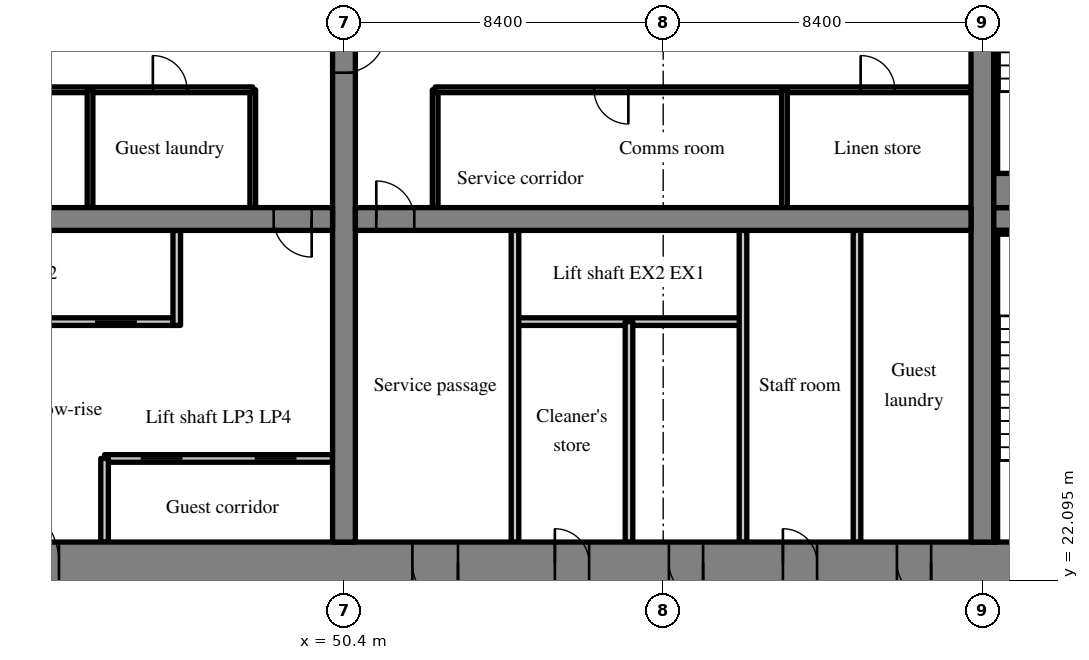
"""IFC4 building model, lengths in metres.
Left out: names, types, materials, properties, quantities, classifications, styles, units other than length and angle.
Written with IfcOpenShell. Run it as: python <this file> out.ifc"""

import sys

from ifc_helpers import new_model, si_unit, direction, frame, frame_2d, origin, place, context, subcontext, project, spatial, rectangle, extrude, source, transform, mapped, element, fill, save


model = new_model("IFC4")
c1 = context("Model", 3, precision=1e-05, world=origin(), true_north=direction((0.0, 1.0)))
c2 = subcontext(c1, "Body", "Model", "MODEL_VIEW")
j1 = project(units=[si_unit("LENGTHUNIT", "METRE"), si_unit("PLANEANGLEUNIT", "RADIAN")], contexts=[c1])
p1 = place(None, origin())
s1 = spatial("IfcSite", under=j1, at=p1, CompositionType="ELEMENT")
p2 = place(p1, origin())
s2 = spatial("IfcBuilding", under=s1, at=p2, CompositionType="ELEMENT")
p3 = place(p2, frame((0.0, 0.0, 35.4)))
s3 = spatial("IfcBuildingStorey", under=s2, at=p3, CompositionType="ELEMENT", Elevation=35.4)
m1 = source(origin(), c2, "Body", "SweptSolid", [
    extrude(rectangle(XDim=50.4, YDim=1.1, at=frame_2d((25.2, 0.0))), origin(), (0.0, 0.0, 1.0), 3.52),
])
p4 = place(p3, frame((25.2, 22.55, 0.0), z_axis=(0.0, 0.0, 1.0), x_axis=(1.0, 0.0, 0.0)))
e1 = element("IfcWall", 1, at=p4, inside=s3, PredefinedType="SHEAR", context=c2, shape_type="MappedRepresentation", body=[
    mapped(m1, transform((0.0, 0.0, 0.0), scale=1.0)),
])
m2 = source(origin(), c2, "Body", "SweptSolid", [
    extrude(rectangle(XDim=1.8, YDim=2.1, at=frame_2d((0.9, 1.05))), frame((0.0, 0.56, 0.0), z_axis=(0.0, -1.0, 0.0), x_axis=(1.0, 0.0, 0.0)), (0.0, 0.0, 1.0), 1.12),
])
p5 = place(p4, frame((15.9, 0.0, 0.0)))
e2 = element("IfcOpeningElement", 2, at=p5, cuts=e1, PredefinedType="OPENING", context=c2, shape_type="MappedRepresentation", body=[
    mapped(m2, transform((0.0, 0.0, 0.0), scale=1.0)),
])
m3 = source(origin(), c2, "Body", "SweptSolid", [
    extrude(rectangle(XDim=1.2, YDim=2.1, at=frame_2d((0.6, 1.05))), frame((0.0, 0.56, 0.0), z_axis=(0.0, -1.0, 0.0), x_axis=(1.0, 0.0, 0.0)), (0.0, 0.0, 1.0), 1.12),
])
p6 = place(p4, frame((27.0, 0.0, 0.0)))
e3 = element("IfcOpeningElement", 3, at=p6, cuts=e1, PredefinedType="OPENING", context=c2, shape_type="MappedRepresentation", body=[
    mapped(m3, transform((0.0, 0.0, 0.0), scale=1.0)),
])
m4 = source(origin(), c2, "Body", "SweptSolid", [
    extrude(rectangle(XDim=0.9, YDim=2.1, at=frame_2d((0.45, 1.05))), frame((0.0, 0.56, 0.0), z_axis=(0.0, -1.0, 0.0), x_axis=(1.0, 0.0, 0.0)), (0.0, 0.0, 1.0), 1.12),
])
p7 = place(p4, frame((33.75, 0.0, 0.0)))
e4 = element("IfcOpeningElement", 4, at=p7, cuts=e1, PredefinedType="OPENING", context=c2, shape_type="MappedRepresentation", body=[
    mapped(m4, transform((0.0, 0.0, 0.0), scale=1.0)),
])
p8 = place(p4, frame((30.75, 0.0, 0.0)))
e5 = element("IfcOpeningElement", 5, at=p8, cuts=e1, PredefinedType="OPENING", context=c2, shape_type="MappedRepresentation", body=[
    mapped(m4, transform((0.0, 0.0, 0.0), scale=1.0)),
])
p9 = place(p4, frame((39.75, 0.0, 0.0)))
e6 = element("IfcOpeningElement", 6, at=p9, cuts=e1, PredefinedType="OPENING", context=c2, shape_type="MappedRepresentation", body=[
    mapped(m4, transform((0.0, 0.0, 0.0), scale=1.0)),
])
p10 = place(p4, frame((36.75, 0.0, 0.0)))
e7 = element("IfcOpeningElement", 7, at=p10, cuts=e1, PredefinedType="OPENING", context=c2, shape_type="MappedRepresentation", body=[
    mapped(m4, transform((0.0, 0.0, 0.0), scale=1.0)),
])
p11 = place(p4, frame((6.425, 0.0, 0.0)))
e8 = element("IfcOpeningElement", 8, at=p11, cuts=e1, PredefinedType="OPENING", context=c2, shape_type="MappedRepresentation", body=[
    mapped(m3, transform((0.0, 0.0, 0.0), scale=1.0)),
])
p12 = place(p4, frame((47.675, 0.0, 0.0)))
e9 = element("IfcOpeningElement", 9, at=p12, cuts=e1, PredefinedType="OPENING", context=c2, shape_type="MappedRepresentation", body=[
    mapped(m3, transform((0.0, 0.0, 0.0), scale=1.0)),
])
m5 = source(origin(), c2, "Body", "SweptSolid", [
    extrude(rectangle(XDim=17.8, YDim=0.6, at=frame_2d((8.9, 0.0))), origin(), (0.0, 0.0, 1.0), 3.52),
])
p13 = place(p3, frame((50.4, 23.1, 0.0), z_axis=(0.0, 0.0, 1.0), x_axis=(0.0, 1.0, 0.0)))
e10 = element("IfcWall", 10, at=p13, inside=s3, PredefinedType="SHEAR", context=c2, shape_type="MappedRepresentation", body=[
    mapped(m5, transform((0.0, 0.0, 0.0), scale=1.0)),
])
m6 = source(origin(), c2, "Body", "SweptSolid", [
    extrude(rectangle(XDim=1.1, YDim=2.1, at=frame_2d((0.55, 1.05))), frame((0.0, 0.31, 0.0), z_axis=(0.0, -1.0, 0.0), x_axis=(1.0, 0.0, 0.0)), (0.0, 0.0, 1.0), 0.62),
])
p14 = place(p13, frame((12.35, 0.0, 0.0)))
e11 = element("IfcOpeningElement", 11, at=p14, cuts=e10, PredefinedType="OPENING", context=c2, shape_type="MappedRepresentation", body=[
    mapped(m6, transform((0.0, 0.0, 0.0), scale=1.0)),
])
p15 = place(p3, frame((67.2, 23.1, 0.0), z_axis=(0.0, 0.0, 1.0), x_axis=(0.0, 1.0, 0.0)))
e12 = element("IfcWall", 12, at=p15, inside=s3, PredefinedType="SHEAR", context=c2, shape_type="MappedRepresentation", body=[
    mapped(m5, transform((0.0, 0.0, 0.0), scale=1.0)),
])
m7 = source(origin(), c2, "Body", "SweptSolid", [
    extrude(rectangle(XDim=16.2, YDim=0.6, at=frame_2d((8.1, 0.0))), origin(), (0.0, 0.0, 1.0), 3.52),
])
p16 = place(p3, frame((33.9, 31.6, 0.0), z_axis=(0.0, 0.0, 1.0), x_axis=(1.0, 0.0, 0.0)))
e13 = element("IfcWall", 13, at=p16, inside=s3, PredefinedType="SHEAR", context=c2, shape_type="MappedRepresentation", body=[
    mapped(m7, transform((0.0, 0.0, 0.0), scale=1.0)),
])
m8 = source(origin(), c2, "Body", "SweptSolid", [
    extrude(rectangle(XDim=1.0, YDim=2.1, at=frame_2d((0.5, 1.05))), frame((0.0, 0.31, 0.0), z_axis=(0.0, -1.0, 0.0), x_axis=(1.0, 0.0, 0.0)), (0.0, 0.0, 1.0), 0.62),
])
p17 = place(p16, frame((14.65, 0.0, 0.0)))
e14 = element("IfcOpeningElement", 14, at=p17, cuts=e13, PredefinedType="OPENING", context=c2, shape_type="MappedRepresentation", body=[
    mapped(m8, transform((0.0, 0.0, 0.0), scale=1.0)),
])
m9 = source(origin(), c2, "Body", "SweptSolid", [
    extrude(rectangle(XDim=16.2, YDim=0.6, at=frame_2d((8.1, 0.0))), origin(), (0.0, 0.0, 1.0), 3.52),
])
p18 = place(p3, frame((50.7, 31.6, 0.0), z_axis=(0.0, 0.0, 1.0), x_axis=(1.0, 0.0, 0.0)))
e15 = element("IfcWall", 15, at=p18, inside=s3, PredefinedType="SHEAR", context=c2, shape_type="MappedRepresentation", body=[
    mapped(m9, transform((0.0, 0.0, 0.0), scale=1.0)),
])
p19 = place(p18, frame((0.55, 0.0, 0.0)))
e16 = element("IfcOpeningElement", 16, at=p19, cuts=e15, PredefinedType="OPENING", context=c2, shape_type="MappedRepresentation", body=[
    mapped(m8, transform((0.0, 0.0, 0.0), scale=1.0)),
])
m10 = source(origin(), c2, "Body", "SweptSolid", [
    extrude(rectangle(XDim=7.0, YDim=0.6, at=frame_2d((3.5, 0.0))), origin(), (0.0, 0.0, 1.0), 3.52),
])
p20 = place(p3, frame((67.5, 31.6, 0.0), z_axis=(0.0, 0.0, 1.0), x_axis=(1.0, 0.0, 0.0)))
e17 = element("IfcWall", 17, at=p20, inside=s3, PredefinedType="SHEAR", context=c2, shape_type="MappedRepresentation", body=[
    mapped(m10, transform((0.0, 0.0, 0.0), scale=1.0)),
])
p21 = place(p20, frame((5.425, 0.0, 0.0)))
e18 = element("IfcOpeningElement", 18, at=p21, cuts=e17, PredefinedType="OPENING", context=c2, shape_type="MappedRepresentation", body=[
    mapped(m6, transform((0.0, 0.0, 0.0), scale=1.0)),
])
m11 = source(origin(), c2, "Body", "SweptSolid", [
    extrude(rectangle(XDim=6.0, YDim=0.2, at=frame_2d((3.0, 0.0))), origin(), (0.0, 0.0, 1.0), 3.52),
])
p22 = place(p3, frame((44.1, 25.3, 0.0), z_axis=(0.0, 0.0, 1.0), x_axis=(1.0, 0.0, 0.0)))
e19 = element("IfcWall", 19, at=p22, inside=s3, PredefinedType="SOLIDWALL", context=c2, shape_type="MappedRepresentation", body=[
    mapped(m11, transform((0.0, 0.0, 0.0), scale=1.0)),
])
m12 = source(origin(), c2, "Body", "SweptSolid", [
    extrude(rectangle(XDim=1.1, YDim=2.1, at=frame_2d((0.55, 1.05))), frame((0.0, 0.11, 0.0), z_axis=(0.0, -1.0, 0.0), x_axis=(1.0, 0.0, 0.0)), (0.0, 0.0, 1.0), 0.22),
])
p23 = place(p22, frame((0.95, 0.0, 0.0)))
e20 = element("IfcOpeningElement", 20, at=p23, cuts=e19, PredefinedType="OPENING", context=c2, shape_type="MappedRepresentation", body=[
    mapped(m12, transform((0.0, 0.0, 0.0), scale=1.0)),
])
p24 = place(p22, frame((3.95, 0.0, 0.0)))
e21 = element("IfcOpeningElement", 21, at=p24, cuts=e19, PredefinedType="OPENING", context=c2, shape_type="MappedRepresentation", body=[
    mapped(m12, transform((0.0, 0.0, 0.0), scale=1.0)),
])
m13 = source(origin(), c2, "Body", "SweptSolid", [
    extrude(rectangle(XDim=12.0, YDim=0.2, at=frame_2d((6.0, 0.0))), origin(), (0.0, 0.0, 1.0), 3.52),
])
p25 = place(p3, frame((33.9, 28.9, 0.0), z_axis=(0.0, 0.0, 1.0), x_axis=(1.0, 0.0, 0.0)))
e22 = element("IfcWall", 22, at=p25, inside=s3, PredefinedType="SOLIDWALL", context=c2, shape_type="MappedRepresentation", body=[
    mapped(m13, transform((0.0, 0.0, 0.0), scale=1.0)),
])
p26 = place(p25, frame((0.95, 0.0, 0.0)))
e23 = element("IfcOpeningElement", 23, at=p26, cuts=e22, PredefinedType="OPENING", context=c2, shape_type="MappedRepresentation", body=[
    mapped(m12, transform((0.0, 0.0, 0.0), scale=1.0)),
])
p27 = place(p25, frame((3.95, 0.0, 0.0)))
e24 = element("IfcOpeningElement", 24, at=p27, cuts=e22, PredefinedType="OPENING", context=c2, shape_type="MappedRepresentation", body=[
    mapped(m12, transform((0.0, 0.0, 0.0), scale=1.0)),
])
p28 = place(p25, frame((6.95, 0.0, 0.0)))
e25 = element("IfcOpeningElement", 25, at=p28, cuts=e22, PredefinedType="OPENING", context=c2, shape_type="MappedRepresentation", body=[
    mapped(m12, transform((0.0, 0.0, 0.0), scale=1.0)),
])
p29 = place(p25, frame((9.95, 0.0, 0.0)))
e26 = element("IfcOpeningElement", 26, at=p29, cuts=e22, PredefinedType="OPENING", context=c2, shape_type="MappedRepresentation", body=[
    mapped(m12, transform((0.0, 0.0, 0.0), scale=1.0)),
])
m14 = source(origin(), c2, "Body", "SweptSolid", [
    extrude(rectangle(XDim=2.2, YDim=0.2, at=frame_2d((1.1, 0.0))), origin(), (0.0, 0.0, 1.0), 3.52),
])
p30 = place(p3, frame((44.1, 23.1, 0.0), z_axis=(0.0, 0.0, 1.0), x_axis=(0.0, 1.0, 0.0)))
e27 = element("IfcWall", 27, at=p30, inside=s3, PredefinedType="SOLIDWALL", context=c2, shape_type="MappedRepresentation", body=[
    mapped(m14, transform((0.0, 0.0, 0.0), scale=1.0)),
])
m15 = source(origin(), c2, "Body", "SweptSolid", [
    extrude(rectangle(XDim=2.5, YDim=0.2, at=frame_2d((1.25, 0.0))), origin(), (0.0, 0.0, 1.0), 3.52),
])
p31 = place(p3, frame((46.0, 28.8, 0.0), z_axis=(0.0, 0.0, 1.0), x_axis=(0.0, 1.0, 0.0)))
e28 = element("IfcWall", 28, at=p31, inside=s3, PredefinedType="SOLIDWALL", context=c2, shape_type="MappedRepresentation", body=[
    mapped(m15, transform((0.0, 0.0, 0.0), scale=1.0)),
])
m16 = source(origin(), c2, "Body", "SweptSolid", [
    extrude(rectangle(XDim=3.1, YDim=0.15, at=frame_2d((1.55, 0.0))), origin(), (0.0, 0.0, 1.0), 3.52),
])
p32 = place(p3, frame((48.0, 31.9, 0.0), z_axis=(0.0, 0.0, 1.0), x_axis=(0.0, 1.0, 0.0)))
e29 = element("IfcWall", 29, at=p32, inside=s3, PredefinedType="PARTITIONING", context=c2, shape_type="MappedRepresentation", body=[
    mapped(m16, transform((0.0, 0.0, 0.0), scale=1.0)),
])
m17 = source(origin(), c2, "Body", "SweptSolid", [
    extrude(rectangle(XDim=14.1, YDim=0.15, at=frame_2d((7.05, 0.0))), origin(), (0.0, 0.0, 1.0), 3.52),
])
p33 = place(p3, frame((33.9, 35.0, 0.0), z_axis=(0.0, 0.0, 1.0), x_axis=(1.0, 0.0, 0.0)))
e30 = element("IfcWall", 30, at=p33, inside=s3, PredefinedType="PARTITIONING", context=c2, shape_type="MappedRepresentation", body=[
    mapped(m17, transform((0.0, 0.0, 0.0), scale=1.0)),
])
m18 = source(origin(), c2, "Body", "SweptSolid", [
    extrude(rectangle(XDim=0.9, YDim=2.1, at=frame_2d((0.45, 1.05))), frame((0.0, 0.085, 0.0), z_axis=(0.0, -1.0, 0.0), x_axis=(1.0, 0.0, 0.0)), (0.0, 0.0, 1.0), 0.17),
])
p34 = place(p33, frame((0.952, 0.0, 0.0)))
e31 = element("IfcOpeningElement", 31, at=p34, cuts=e30, PredefinedType="OPENING", context=c2, shape_type="MappedRepresentation", body=[
    mapped(m18, transform((0.0, 0.0, 0.0), scale=1.0)),
])
p35 = place(p33, frame((5.861, 0.0, 0.0)))
e32 = element("IfcOpeningElement", 32, at=p35, cuts=e30, PredefinedType="OPENING", context=c2, shape_type="MappedRepresentation", body=[
    mapped(m18, transform((0.0, 0.0, 0.0), scale=1.0)),
])
p36 = place(p33, frame((11.471, 0.0, 0.0)))
e33 = element("IfcOpeningElement", 33, at=p36, cuts=e30, PredefinedType="OPENING", context=c2, shape_type="MappedRepresentation", body=[
    mapped(m18, transform((0.0, 0.0, 0.0), scale=1.0)),
])
p37 = place(p3, frame((43.718, 31.9, 0.0), z_axis=(0.0, 0.0, 1.0), x_axis=(0.0, 1.0, 0.0)))
e34 = element("IfcWall", 34, at=p37, inside=s3, PredefinedType="PARTITIONING", context=c2, shape_type="MappedRepresentation", body=[
    mapped(m16, transform((0.0, 0.0, 0.0), scale=1.0)),
])
p38 = place(p3, frame((60.9, 28.9, 0.0), z_axis=(0.0, 0.0, 1.0), x_axis=(-1.0, 0.0, 0.0)))
e35 = element("IfcWall", 35, at=p38, inside=s3, PredefinedType="SOLIDWALL", context=c2, shape_type="MappedRepresentation", body=[
    mapped(m11, transform((0.0, 0.0, 0.0), scale=1.0)),
])
m19 = source(origin(), c2, "Body", "SweptSolid", [
    extrude(rectangle(XDim=8.2, YDim=0.2, at=frame_2d((4.1, 0.0))), origin(), (0.0, 0.0, 1.0), 3.52),
])
for number, where, z_axis, x_axis in (
    (36, (54.9, 23.1, 0.0), (0.0, 0.0, 1.0), (0.0, 1.0, 0.0)),
    (37, (60.9, 23.1, 0.0), (0.0, 0.0, 1.0), (0.0, 1.0, 0.0)),
):
    element("IfcWall", number, at=place(p3, frame(where, z_axis=z_axis, x_axis=x_axis)), inside=s3, PredefinedType="PARTITIONING", context=c2, shape_type="MappedRepresentation", body=[
        mapped(m19, transform((0.0, 0.0, 0.0), scale=1.0)),
    ])
m20 = source(origin(), c2, "Body", "SweptSolid", [
    extrude(rectangle(XDim=5.8, YDim=0.2, at=frame_2d((2.9, 0.0))), origin(), (0.0, 0.0, 1.0), 3.52),
])
p39 = place(p3, frame((57.9, 23.1, 0.0), z_axis=(0.0, 0.0, 1.0), x_axis=(0.0, 1.0, 0.0)))
e38 = element("IfcWall", 38, at=p39, inside=s3, PredefinedType="PARTITIONING", context=c2, shape_type="MappedRepresentation", body=[
    mapped(m20, transform((0.0, 0.0, 0.0), scale=1.0)),
])
p40 = place(p3, frame((63.9, 23.1, 0.0), z_axis=(0.0, 0.0, 1.0), x_axis=(0.0, 1.0, 0.0)))
e39 = element("IfcWall", 39, at=p40, inside=s3, PredefinedType="PARTITIONING", context=c2, shape_type="MappedRepresentation", body=[
    mapped(m19, transform((0.0, 0.0, 0.0), scale=1.0)),
])
p41 = place(p3, frame((52.8, 31.9, 0.0), z_axis=(0.0, 0.0, 1.0), x_axis=(0.0, 1.0, 0.0)))
e40 = element("IfcWall", 40, at=p41, inside=s3, PredefinedType="PARTITIONING", context=c2, shape_type="MappedRepresentation", body=[
    mapped(m16, transform((0.0, 0.0, 0.0), scale=1.0)),
])
m21 = source(origin(), c2, "Body", "SweptSolid", [
    extrude(rectangle(XDim=14.1, YDim=0.15, at=frame_2d((7.05, 0.0))), origin(), (0.0, 0.0, 1.0), 3.52),
])
p42 = place(p3, frame((66.9, 35.0, 0.0), z_axis=(0.0, 0.0, 1.0), x_axis=(-1.0, 0.0, 0.0)))
e41 = element("IfcWall", 41, at=p42, inside=s3, PredefinedType="PARTITIONING", context=c2, shape_type="MappedRepresentation", body=[
    mapped(m21, transform((0.0, 0.0, 0.0), scale=1.0)),
])
p43 = place(p42, frame((2.004, 0.0, 0.0)))
e42 = element("IfcOpeningElement", 42, at=p43, cuts=e41, PredefinedType="OPENING", context=c2, shape_type="MappedRepresentation", body=[
    mapped(m18, transform((0.0, 0.0, 0.0), scale=1.0)),
])
p44 = place(p42, frame((9.017, 0.0, 0.0)))
e43 = element("IfcOpeningElement", 43, at=p44, cuts=e41, PredefinedType="OPENING", context=c2, shape_type="MappedRepresentation", body=[
    mapped(m18, transform((0.0, 0.0, 0.0), scale=1.0)),
])
p45 = place(p3, frame((61.991, 31.9, 0.0), z_axis=(0.0, 0.0, 1.0), x_axis=(0.0, 1.0, 0.0)))
e44 = element("IfcWall", 44, at=p45, inside=s3, PredefinedType="PARTITIONING", context=c2, shape_type="MappedRepresentation", body=[
    mapped(m16, transform((0.0, 0.0, 0.0), scale=1.0)),
])
m22 = source(origin(), c2, "Body", "SweptSolid", [
    extrude(rectangle(XDim=4.75, YDim=0.1, at=frame_2d((2.375, 0.0))), origin(), (0.0, 0.0, 1.0), 3.52),
])
p46 = place(p3, frame((67.5, 31.25, 0.0), z_axis=(0.0, 0.0, 1.0), x_axis=(1.0, 0.0, 0.0)))
e45 = element("IfcWall", 45, at=p46, inside=s3, PredefinedType="SOLIDWALL", context=c2, shape_type="MappedRepresentation", body=[
    mapped(m22, transform((0.0, 0.0, 0.0), scale=1.0)),
])
m23 = source(origin(), c2, "Body", "SweptSolid", [
    extrude(rectangle(XDim=8.1, YDim=0.1, at=frame_2d((4.05, 0.0))), origin(), (0.0, 0.0, 1.0), 3.52),
])
p47 = place(p3, frame((67.55, 23.1, 0.0), z_axis=(0.0, 0.0, 1.0), x_axis=(0.0, 1.0, 0.0)))
e46 = element("IfcWall", 46, at=p47, inside=s3, PredefinedType="SOLIDWALL", context=c2, shape_type="MappedRepresentation", body=[
    mapped(m23, transform((0.0, 0.0, 0.0), scale=1.0)),
])
m24 = source(origin(), c2, "Body", "SweptSolid", [
    extrude(rectangle(XDim=4.75, YDim=0.9, at=frame_2d((2.375, 0.0))), origin(), (0.0, 0.0, 1.0), 3.52),
])
p48 = place(p3, frame((67.5, 32.35, 0.0), z_axis=(0.0, 0.0, 1.0), x_axis=(1.0, 0.0, 0.0)))
e47 = element("IfcWall", 47, at=p48, inside=s3, PredefinedType="SOLIDWALL", context=c2, shape_type="MappedRepresentation", body=[
    mapped(m24, transform((0.0, 0.0, 0.0), scale=1.0)),
])
p49 = place(p3, frame((67.55, 32.8, 0.0), z_axis=(0.0, 0.0, 1.0), x_axis=(0.0, 1.0, 0.0)))
e48 = element("IfcWall", 48, at=p49, inside=s3, PredefinedType="SOLIDWALL", context=c2, shape_type="MappedRepresentation", body=[
    mapped(m23, transform((0.0, 0.0, 0.0), scale=1.0)),
])
m25 = source(origin(), c2, "Body", "SweptSolid", [
    extrude(rectangle(XDim=1.8, YDim=2.1, at=frame_2d((0.9, 1.05))), frame((0.0, 0.325, 0.0), z_axis=(0.0, -1.0, 0.0), x_axis=(1.0, 0.0, 0.0)), (0.0, 0.0, 1.0), 0.05),
])
p50 = place(p5, origin())
e49 = element("IfcDoor", 49, at=p50, inside=s3, OperationType="DOUBLE_DOOR_SINGLE_SWING", PredefinedType="DOOR", context=c2, shape_type="MappedRepresentation", body=[
    mapped(m25, transform((0.0, 0.0, 0.0), scale=1.0)),
])
fill(e2, e49)
m26 = source(origin(), c2, "Body", "SweptSolid", [
    extrude(rectangle(XDim=1.0, YDim=2.1, at=frame_2d((0.5, 1.05))), frame((0.0, 0.025, 0.0), z_axis=(0.0, -1.0, 0.0), x_axis=(1.0, 0.0, 0.0)), (0.0, 0.0, 1.0), 0.05),
])
p51 = place(p17, origin())
e50 = element("IfcDoor", 50, at=p51, inside=s3, OperationType="SINGLE_SWING_RIGHT", PredefinedType="DOOR", context=c2, shape_type="MappedRepresentation", body=[
    mapped(m26, transform((0.0, 0.0, 0.0), scale=1.0)),
])
fill(e14, e50)
m27 = source(origin(), c2, "Body", "SweptSolid", [
    extrude(rectangle(XDim=1.1, YDim=2.1, at=frame_2d((0.55, 1.05))), frame((0.0, 0.025, 0.0), z_axis=(0.0, -1.0, 0.0), x_axis=(1.0, 0.0, 0.0)), (0.0, 0.0, 1.0), 0.05),
])
p52 = place(p23, origin())
e51 = element("IfcDoor", 51, at=p52, inside=s3, OperationType="SLIDING_TO_LEFT", PredefinedType="DOOR", context=c2, shape_type="MappedRepresentation", body=[
    mapped(m27, transform((0.0, 0.0, 0.0), scale=1.0)),
])
fill(e20, e51)
p53 = place(p24, origin())
e52 = element("IfcDoor", 52, at=p53, inside=s3, OperationType="SLIDING_TO_RIGHT", PredefinedType="DOOR", context=c2, shape_type="MappedRepresentation", body=[
    mapped(m27, transform((0.0, 0.0, 0.0), scale=1.0)),
])
fill(e21, e52)
p54 = place(p29, origin())
e53 = element("IfcDoor", 53, at=p54, inside=s3, OperationType="SLIDING_TO_RIGHT", PredefinedType="DOOR", context=c2, shape_type="MappedRepresentation", body=[
    mapped(m27, transform((0.0, 0.0, 0.0), scale=1.0)),
])
fill(e26, e53)
m28 = source(origin(), c2, "Body", "SweptSolid", [
    extrude(rectangle(XDim=0.9, YDim=2.1, at=frame_2d((0.45, 1.05))), frame((0.0, 0.025, 0.0), z_axis=(0.0, -1.0, 0.0), x_axis=(1.0, 0.0, 0.0)), (0.0, 0.0, 1.0), 0.05),
])
p55 = place(p36, origin())
e54 = element("IfcDoor", 54, at=p55, inside=s3, OperationType="SINGLE_SWING_LEFT", PredefinedType="DOOR", context=c2, shape_type="MappedRepresentation", body=[
    mapped(m28, transform((0.0, 0.0, 0.0), scale=1.0)),
])
fill(e33, e54)
m29 = source(origin(), c2, "Body", "SweptSolid", [
    extrude(rectangle(XDim=1.2, YDim=2.1, at=frame_2d((0.6, 1.05))), frame((0.0, 0.325, 0.0), z_axis=(0.0, -1.0, 0.0), x_axis=(1.0, 0.0, 0.0)), (0.0, 0.0, 1.0), 0.05),
])
p56 = place(p6, origin())
e55 = element("IfcDoor", 55, at=p56, inside=s3, OperationType="SINGLE_SWING_RIGHT", PredefinedType="DOOR", context=c2, shape_type="MappedRepresentation", body=[
    mapped(m29, transform((0.0, 0.0, 0.0), scale=1.0)),
])
fill(e3, e55)
p57 = place(p19, origin())
e56 = element("IfcDoor", 56, at=p57, inside=s3, OperationType="SINGLE_SWING_LEFT", PredefinedType="DOOR", context=c2, shape_type="MappedRepresentation", body=[
    mapped(m26, transform((0.0, 0.0, 0.0), scale=1.0)),
])
fill(e16, e56)
m30 = source(origin(), c2, "Body", "SweptSolid", [
    extrude(rectangle(XDim=0.9, YDim=2.1, at=frame_2d((0.45, 1.05))), frame((0.0, 0.325, 0.0), z_axis=(0.0, -1.0, 0.0), x_axis=(1.0, 0.0, 0.0)), (0.0, 0.0, 1.0), 0.05),
])
p58 = place(p7, origin())
e57 = element("IfcDoor", 57, at=p58, inside=s3, OperationType="SINGLE_SWING_RIGHT", PredefinedType="DOOR", context=c2, shape_type="MappedRepresentation", body=[
    mapped(m30, transform((0.0, 0.0, 0.0), scale=1.0)),
])
fill(e4, e57)
p59 = place(p8, origin())
e58 = element("IfcDoor", 58, at=p59, inside=s3, OperationType="SINGLE_SWING_LEFT", PredefinedType="DOOR", context=c2, shape_type="MappedRepresentation", body=[
    mapped(m30, transform((0.0, 0.0, 0.0), scale=1.0)),
])
fill(e5, e58)
p60 = place(p9, origin())
e59 = element("IfcDoor", 59, at=p60, inside=s3, OperationType="SINGLE_SWING_RIGHT", PredefinedType="DOOR", context=c2, shape_type="MappedRepresentation", body=[
    mapped(m30, transform((0.0, 0.0, 0.0), scale=1.0)),
])
fill(e6, e59)
p61 = place(p10, origin())
e60 = element("IfcDoor", 60, at=p61, inside=s3, OperationType="SINGLE_SWING_LEFT", PredefinedType="DOOR", context=c2, shape_type="MappedRepresentation", body=[
    mapped(m30, transform((0.0, 0.0, 0.0), scale=1.0)),
])
fill(e7, e60)
p62 = place(p43, origin())
e61 = element("IfcDoor", 61, at=p62, inside=s3, OperationType="SINGLE_SWING_RIGHT", PredefinedType="DOOR", context=c2, shape_type="MappedRepresentation", body=[
    mapped(m28, transform((0.0, 0.0, 0.0), scale=1.0)),
])
fill(e42, e61)
p63 = place(p44, origin())
e62 = element("IfcDoor", 62, at=p63, inside=s3, OperationType="SINGLE_SWING_LEFT", PredefinedType="DOOR", context=c2, shape_type="MappedRepresentation", body=[
    mapped(m28, transform((0.0, 0.0, 0.0), scale=1.0)),
])
fill(e43, e62)
p64 = place(p14, origin())
e63 = element("IfcDoor", 63, at=p64, inside=s3, OperationType="SINGLE_SWING_RIGHT", PredefinedType="DOOR", context=c2, shape_type="MappedRepresentation", body=[
    mapped(m27, transform((0.0, 0.0, 0.0), scale=1.0)),
])
fill(e11, e63)
save(model, sys.argv[1])
